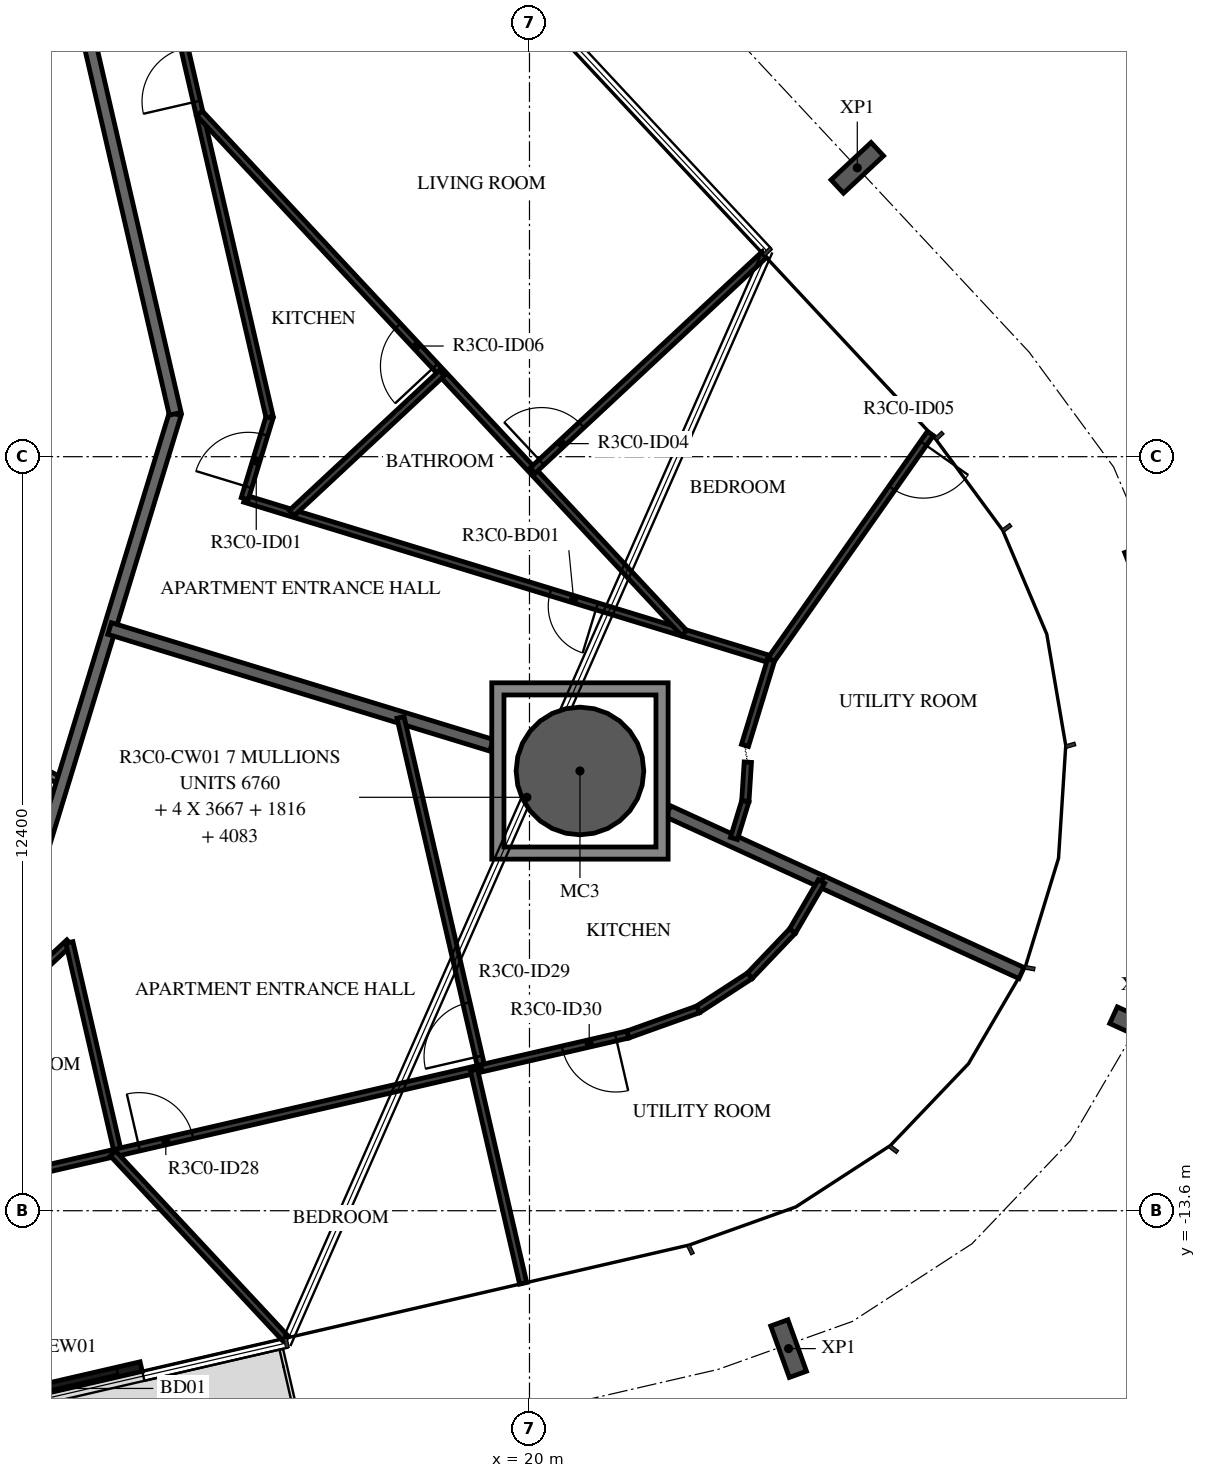
"""IFC4 building model, lengths in metres.
Left out: names, types, materials, properties, quantities, classifications, styles, units other than length and angle.
Written with IfcOpenShell. Run it as: python <this file> out.ifc"""

import sys

from ifc_helpers import new_model, si_unit, direction, frame, frame_2d, origin, origin_2d, place, context, subcontext, project, spatial, polyline, rectangle, hollow_circle, i_section, outline, extrude, element, fill, save


model = new_model("IFC4")
c1 = context("Model", 3, precision=1e-05, world=origin(), true_north=direction((0.0, 1.0)))
c2 = subcontext(c1, "Body", "Model", "MODEL_VIEW")
j1 = project(units=[si_unit("LENGTHUNIT", "METRE"), si_unit("PLANEANGLEUNIT", "RADIAN")], contexts=[c1])
p1 = place(None, origin())
s1 = spatial("IfcSite", under=j1, at=p1, CompositionType="ELEMENT")
p2 = place(p1, origin())
s2 = spatial("IfcBuilding", under=s1, at=p2, CompositionType="ELEMENT")
p3 = place(p2, frame((0.0, 0.0, 141.4)))
s3 = spatial("IfcBuildingStorey", under=s2, at=p3, CompositionType="ELEMENT", Elevation=141.4)
p4 = place(p3, frame((20.83, -6.368, -0.38), z_axis=(0.0, 0.0, 1.0), x_axis=(1.0, 0.0, 0.0)))
e1 = element("IfcColumn", 1, at=p4, inside=s3, PredefinedType="COLUMN", context=c2, shape_type="SweptSolid", body=[
    extrude(hollow_circle(Radius=1.05, WallThickness=0.05, at=origin_2d()), origin(), (0.0, 0.0, 1.0), 2.616),
])
for number, where, z_axis, x_axis in (
    (2, (24.261, -15.868, -0.38), (0.0, 0.0, 1.0), (-0.941, -0.34, 0.0)),
    (3, (30.014, -10.571, -0.38), (0.0, 0.0, 1.0), (-0.416, -0.909, 0.0)),
    (4, (30.262, -2.756, -0.38), (0.0, 0.0, 1.0), (0.358, -0.934, 0.0)),
    (5, (25.391, 3.55, -0.38), (0.0, 0.0, 1.0), (0.682, -0.731, 0.0)),
):
    element("IfcColumn", number, at=place(p3, frame(where, z_axis=z_axis, x_axis=x_axis)), inside=s3, PredefinedType="COLUMN", context=c2, shape_type="SweptSolid", body=[
        extrude(i_section(OverallWidth=0.3, OverallDepth=0.9, WebThickness=0.019, FlangeThickness=0.035, FilletRadius=0.03, at=origin_2d()), origin(), (0.0, 0.0, 1.0), 2.616),
    ])
p5 = place(p3, frame((10.496, -16.883, 0.0), z_axis=(0.0, 0.0, 1.0), x_axis=(0.974364187477, 0.224976510247, 0.0)))
e6 = element("IfcWall", 6, at=p5, inside=s3, PredefinedType="STANDARD", context=c2, shape_type="SweptSolid", body=[
    extrude(rectangle(XDim=3.2, YDim=0.16, at=frame_2d((1.6, 0.0))), origin(), (0.0, 0.0, 1.0), 3.05),
])
p6 = place(p5, frame((0.4, 0.0, 0.0)))
e7 = element("IfcOpeningElement", 7, at=p6, cuts=e6, PredefinedType="OPENING", context=c2, shape_type="SweptSolid", body=[
    extrude(rectangle(XDim=2.4, YDim=2.4, at=frame_2d((1.2, 1.2))), frame((0.0, 0.09, 0.0), z_axis=(0.0, -1.0, 0.0), x_axis=(1.0, 0.0, 0.0)), (0.0, 0.0, 1.0), 0.18),
])
p7 = place(p3, frame((10.511, -5.589, 0.0), z_axis=(0.0, 0.0, 1.0), x_axis=(0.882987820808, -0.469395897196, 0.0)))
e8 = element("IfcWall", 8, at=p7, inside=s3, PredefinedType="PARTITIONING", context=c2, shape_type="SweptSolid", body=[
    extrude(rectangle(XDim=2.052, YDim=0.12, at=frame_2d((1.026, 0.0))), origin(), (0.0, 0.0, 1.0), 3.05),
])
p8 = place(p7, frame((0.1, 0.0, 0.0)))
e9 = element("IfcOpeningElement", 9, at=p8, cuts=e8, PredefinedType="OPENING", context=c2, shape_type="SweptSolid", body=[
    extrude(rectangle(XDim=1.2, YDim=2.1, at=frame_2d((0.6, 1.05))), frame((0.0, 0.07, 0.0), z_axis=(0.0, -1.0, 0.0), x_axis=(1.0, 0.0, 0.0)), (0.0, 0.0, 1.0), 0.14),
])
p9 = place(p3, frame((12.028, -7.516, 0.0), z_axis=(0.0, 0.0, 1.0), x_axis=(0.292365533182, 0.956306642771, 0.0)))
e10 = element("IfcWall", 10, at=p9, inside=s3, PredefinedType="STANDARD", context=c2, shape_type="SweptSolid", body=[
    extrude(rectangle(XDim=7.342, YDim=0.2, at=frame_2d((3.671, 0.0))), origin(), (0.0, 0.0, 1.0), 3.05),
])
p10 = place(p3, frame((14.175, -0.495, 0.0), z_axis=(0.0, 0.0, 1.0), x_axis=(-0.224922649383, 0.974376622151, 0.0)))
e11 = element("IfcWall", 11, at=p10, inside=s3, PredefinedType="STANDARD", context=c2, shape_type="SweptSolid", body=[
    extrude(rectangle(XDim=7.342, YDim=0.2, at=frame_2d((3.671, 0.0))), origin(), (0.0, 0.0, 1.0), 3.05),
])
p11 = place(p3, frame((13.095, -4.026, 0.0), z_axis=(0.0, 0.0, 1.0), x_axis=(0.956303942966, -0.292374363904, 0.0)))
e12 = element("IfcWall", 12, at=p11, inside=s3, PredefinedType="STANDARD", context=c2, shape_type="SweptSolid", body=[
    extrude(rectangle(XDim=6.567, YDim=0.2, at=frame_2d((3.284, 0.0))), origin(), (0.0, 0.0, 1.0), 3.05),
])
p12 = place(p3, frame((22.28, -7.032, 0.0), z_axis=(0.0, 0.0, 1.0), x_axis=(0.909302252994, -0.416136291016, 0.0)))
e13 = element("IfcWall", 13, at=p12, inside=s3, PredefinedType="STANDARD", context=c2, shape_type="SweptSolid", body=[
    extrude(rectangle(XDim=2.773, YDim=0.2, at=frame_2d((1.387, 0.0))), origin(), (0.0, 0.0, 1.0), 3.05),
])
p13 = place(p3, frame((24.802, -8.186, 0.0), z_axis=(0.0, 0.0, 1.0), x_axis=(0.909307466213, -0.416124899387, 0.0)))
e14 = element("IfcWall", 14, at=p13, inside=s3, PredefinedType="STANDARD", context=c2, shape_type="SweptSolid", body=[
    extrude(rectangle(XDim=3.618, YDim=0.2, at=frame_2d((1.809, 0.0))), origin(), (0.0, 0.0, 1.0), 3.05),
])
p14 = place(p3, frame((23.975, -4.537, 0.0), z_axis=(0.0, 0.0, 1.0), x_axis=(-0.956300480156, 0.292385689892, 0.0)))
e15 = element("IfcWall", 15, at=p14, inside=s3, PredefinedType="PARTITIONING", context=c2, shape_type="SweptSolid", body=[
    extrude(rectangle(XDim=9.054, YDim=0.12, at=frame_2d((4.527, 0.0))), origin(), (0.0, 0.0, 1.0), 3.05),
])
p15 = place(p14, frame((2.998, 0.0, 0.0)))
e16 = element("IfcOpeningElement", 16, at=p15, cuts=e15, PredefinedType="OPENING", context=c2, shape_type="SweptSolid", body=[
    extrude(rectangle(XDim=0.8, YDim=2.1, at=frame_2d((0.4, 1.05))), frame((0.0, 0.07, 0.0), z_axis=(0.0, -1.0, 0.0), x_axis=(1.0, 0.0, 0.0)), (0.0, 0.0, 1.0), 0.14),
])
p16 = place(p3, frame((15.317, -1.89, 0.0), z_axis=(0.0, 0.0, 1.0), x_axis=(0.292360095486, 0.956308305186, 0.0)))
e17 = element("IfcWall", 17, at=p16, inside=s3, PredefinedType="PARTITIONING", context=c2, shape_type="SweptSolid", body=[
    extrude(rectangle(XDim=1.402, YDim=0.12, at=frame_2d((0.701, 0.0))), origin(), (0.0, 0.0, 1.0), 3.05),
])
p17 = place(p16, frame((0.2, 0.0, 0.0)))
e18 = element("IfcOpeningElement", 18, at=p17, cuts=e17, PredefinedType="OPENING", context=c2, shape_type="SweptSolid", body=[
    extrude(rectangle(XDim=0.9, YDim=2.1, at=frame_2d((0.45, 1.05))), frame((0.0, 0.07, 0.0), z_axis=(0.0, -1.0, 0.0), x_axis=(1.0, 0.0, 0.0)), (0.0, 0.0, 1.0), 0.14),
])
p18 = place(p3, frame((15.727, -0.549, 0.0), z_axis=(0.0, 0.0, 1.0), x_axis=(-0.22493611855, 0.974373512864, 0.0)))
e19 = element("IfcWall", 19, at=p18, inside=s3, PredefinedType="PARTITIONING", context=c2, shape_type="SweptSolid", body=[
    extrude(rectangle(XDim=8.146, YDim=0.12, at=frame_2d((4.073, 0.0))), origin(), (0.0, 0.0, 1.0), 3.05),
])
p19 = place(p18, frame((5.327, 0.0, 0.0)))
e20 = element("IfcOpeningElement", 20, at=p19, cuts=e19, PredefinedType="OPENING", context=c2, shape_type="SweptSolid", body=[
    extrude(rectangle(XDim=0.9, YDim=2.1, at=frame_2d((0.45, 1.05))), frame((0.0, 0.07, 0.0), z_axis=(0.0, -1.0, 0.0), x_axis=(1.0, 0.0, 0.0)), (0.0, 0.0, 1.0), 0.14),
])
for number, where, z_axis, x_axis in (
    (21, (23.362, -7.478, 0.0), (0.0, 0.0, 1.0), (0.293, 0.956, 0.0)),
    (22, (23.55, -6.864, 0.0), (0.0, 0.0, 1.0), (0.064, 0.998, 0.0)),
):
    element("IfcWall", number, at=place(p3, frame(where, z_axis=z_axis, x_axis=x_axis)), inside=s3, PredefinedType="PARTITIONING", context=c2, shape_type="SweptSolid", body=[
        extrude(rectangle(XDim=0.642, YDim=0.12, at=frame_2d((0.321, 0.0))), origin(), (0.0, 0.0, 1.0), 3.05),
    ])
p20 = place(p3, frame((23.544, -5.948, 0.0), z_axis=(0.0, 0.0, 1.0), x_axis=(0.292386782861, 0.956300145983, 0.0)))
e23 = element("IfcWall", 23, at=p20, inside=s3, PredefinedType="PARTITIONING", context=c2, shape_type="SweptSolid", body=[
    extrude(rectangle(XDim=1.475, YDim=0.12, at=frame_2d((0.737, 0.0))), origin(), (0.0, 0.0, 1.0), 3.05),
])
p21 = place(p3, frame((22.543, -4.1, 0.0), z_axis=(0.0, 0.0, 1.0), x_axis=(-0.681980976228, 0.731369911921, 0.0)))
e24 = element("IfcWall", 24, at=p21, inside=s3, PredefinedType="PARTITIONING", context=c2, shape_type="SweptSolid", body=[
    extrude(rectangle(XDim=11.686, YDim=0.12, at=frame_2d((5.843, 0.0))), origin(), (0.0, 0.0, 1.0), 3.05),
])
p22 = place(p21, frame((6.003, 0.0, 0.0)))
e25 = element("IfcOpeningElement", 25, at=p22, cuts=e24, PredefinedType="OPENING", context=c2, shape_type="SweptSolid", body=[
    extrude(rectangle(XDim=0.9, YDim=2.1, at=frame_2d((0.45, 1.05))), frame((0.0, 0.07, 0.0), z_axis=(0.0, -1.0, 0.0), x_axis=(1.0, 0.0, 0.0)), (0.0, 0.0, 1.0), 0.14),
])
p23 = place(p3, frame((16.091, -2.127, 0.0), z_axis=(0.0, 0.0, 1.0), x_axis=(0.731389706697, 0.6819597473, 0.0)))
e26 = element("IfcWall", 26, at=p23, inside=s3, PredefinedType="PARTITIONING", context=c2, shape_type="SweptSolid", body=[
    extrude(rectangle(XDim=3.374, YDim=0.12, at=frame_2d((1.687, 0.0))), origin(), (0.0, 0.0, 1.0), 3.05),
])
p24 = place(p3, frame((20.052, -1.428, 0.0), z_axis=(0.0, 0.0, 1.0), x_axis=(0.73134872518, 0.682003696601, 0.0)))
e27 = element("IfcWall", 27, at=p24, inside=s3, PredefinedType="PARTITIONING", context=c2, shape_type="SweptSolid", body=[
    extrude(rectangle(XDim=5.2, YDim=0.12, at=frame_2d((2.6, 0.0))), origin(), (0.0, 0.0, 1.0), 3.05),
])
p25 = place(p24, frame((0.2, 0.0, 0.0)))
e28 = element("IfcOpeningElement", 28, at=p25, cuts=e27, PredefinedType="OPENING", context=c2, shape_type="SweptSolid", body=[
    extrude(rectangle(XDim=0.9, YDim=2.1, at=frame_2d((0.45, 1.05))), frame((0.0, 0.07, 0.0), z_axis=(0.0, -1.0, 0.0), x_axis=(1.0, 0.0, 0.0)), (0.0, 0.0, 1.0), 0.14),
])
p26 = place(p3, frame((26.593, -0.818, 0.0), z_axis=(0.0, 0.0, 1.0), x_axis=(-0.575629018128, -0.817710971853, 0.0)))
e29 = element("IfcWall", 29, at=p26, inside=s3, PredefinedType="PARTITIONING", context=c2, shape_type="SweptSolid", body=[
    extrude(rectangle(XDim=4.548, YDim=0.12, at=frame_2d((2.274, 0.0))), origin(), (0.0, 0.0, 1.0), 3.05),
])
p27 = place(p26, frame((0.2, 0.0, 0.0)))
e30 = element("IfcOpeningElement", 30, at=p27, cuts=e29, PredefinedType="OPENING", context=c2, shape_type="SweptSolid", body=[
    extrude(rectangle(XDim=0.9, YDim=2.1, at=frame_2d((0.45, 1.05))), frame((0.0, 0.07, 0.0), z_axis=(0.0, -1.0, 0.0), x_axis=(1.0, 0.0, 0.0)), (0.0, 0.0, 1.0), 0.14),
])
p28 = place(p3, frame((7.388, -13.894, 0.0), z_axis=(0.0, 0.0, 1.0), x_axis=(0.731339966659, 0.682013088707, 0.0)))
e31 = element("IfcWall", 31, at=p28, inside=s3, PredefinedType="PARTITIONING", context=c2, shape_type="SweptSolid", body=[
    extrude(rectangle(XDim=6.899, YDim=0.12, at=frame_2d((3.45, 0.0))), origin(), (0.0, 0.0, 1.0), 3.05),
])
p29 = place(p28, frame((1.3, 0.0, 0.0)))
e32 = element("IfcOpeningElement", 32, at=p29, cuts=e31, PredefinedType="OPENING", context=c2, shape_type="SweptSolid", body=[
    extrude(rectangle(XDim=0.8, YDim=2.1, at=frame_2d((0.4, 1.05))), frame((0.0, 0.07, 0.0), z_axis=(0.0, -1.0, 0.0), x_axis=(1.0, 0.0, 0.0)), (0.0, 0.0, 1.0), 0.14),
])
p30 = place(p3, frame((12.434, -9.189, 0.0), z_axis=(0.0, 0.0, 1.0), x_axis=(0.224924972887, -0.974376085796, 0.0)))
e33 = element("IfcWall", 33, at=p30, inside=s3, PredefinedType="PARTITIONING", context=c2, shape_type="SweptSolid", body=[
    extrude(rectangle(XDim=3.541, YDim=0.12, at=frame_2d((1.771, 0.0))), origin(), (0.0, 0.0, 1.0), 3.05),
])
p31 = place(p3, frame((7.249, -14.02, 0.0), z_axis=(0.0, 0.0, 1.0), x_axis=(0.974369514697, 0.224953437023, 0.0)))
e34 = element("IfcWall", 34, at=p31, inside=s3, PredefinedType="PARTITIONING", context=c2, shape_type="SweptSolid", body=[
    extrude(rectangle(XDim=12.149, YDim=0.12, at=frame_2d((6.074, 0.0))), origin(), (0.0, 0.0, 1.0), 3.05),
])
p32 = place(p31, frame((6.498, 0.0, 0.0)))
e35 = element("IfcOpeningElement", 35, at=p32, cuts=e34, PredefinedType="OPENING", context=c2, shape_type="SweptSolid", body=[
    extrude(rectangle(XDim=0.9, YDim=2.1, at=frame_2d((0.45, 1.05))), frame((0.0, 0.07, 0.0), z_axis=(0.0, -1.0, 0.0), x_axis=(1.0, 0.0, 0.0)), (0.0, 0.0, 1.0), 0.14),
])
p33 = place(p3, frame((19.211, -11.258, 0.0), z_axis=(0.0, 0.0, 1.0), x_axis=(-0.22499500936, 0.974359915926, 0.0)))
e36 = element("IfcWall", 36, at=p33, inside=s3, PredefinedType="PARTITIONING", context=c2, shape_type="SweptSolid", body=[
    extrude(rectangle(XDim=5.921, YDim=0.12, at=frame_2d((2.961, 0.0))), origin(), (0.0, 0.0, 1.0), 3.05),
])
p34 = place(p33, frame((0.2, 0.0, 0.0)))
e37 = element("IfcOpeningElement", 37, at=p34, cuts=e36, PredefinedType="OPENING", context=c2, shape_type="SweptSolid", body=[
    extrude(rectangle(XDim=0.9, YDim=2.1, at=frame_2d((0.45, 1.05))), frame((0.0, 0.07, 0.0), z_axis=(0.0, -1.0, 0.0), x_axis=(1.0, 0.0, 0.0)), (0.0, 0.0, 1.0), 0.14),
])
p35 = place(p3, frame((15.985, -15.698, 0.0), z_axis=(0.0, 0.0, 1.0), x_axis=(-0.681979185924, 0.731371581322, 0.0)))
e38 = element("IfcWall", 38, at=p35, inside=s3, PredefinedType="PARTITIONING", context=c2, shape_type="SweptSolid", body=[
    extrude(rectangle(XDim=4.157, YDim=0.12, at=frame_2d((2.079, 0.0))), origin(), (0.0, 0.0, 1.0), 3.05),
])
p36 = place(p3, frame((19.896, -14.794, 0.0), z_axis=(0.0, 0.0, 1.0), x_axis=(-0.224958568294, 0.974368330023, 0.0)))
e39 = element("IfcWall", 39, at=p36, inside=s3, PredefinedType="PARTITIONING", context=c2, shape_type="SweptSolid", body=[
    extrude(rectangle(XDim=3.6, YDim=0.12, at=frame_2d((1.8, 0.0))), origin(), (0.0, 0.0, 1.0), 3.05),
])
p37 = place(p3, frame((24.802, -8.186, 0.0), z_axis=(0.0, 0.0, 1.0), x_axis=(-0.505043103481, -0.863094122113, 0.0)))
e40 = element("IfcWall", 40, at=p37, inside=s3, PredefinedType="PARTITIONING", context=c2, shape_type="SweptSolid", body=[
    extrude(rectangle(XDim=0.945, YDim=0.12, at=frame_2d((0.473, 0.0))), origin(), (0.0, 0.0, 1.0), 3.05),
])
for number, where, z_axis, x_axis in (
    (41, (24.324, -9.002, 0.0), (0.0, 0.0, 1.0), (-0.69, -0.723, 0.0)),
    (42, (23.623, -9.737, 0.0), (0.0, 0.0, 1.0), (-0.839, -0.545, 0.0)),
):
    element("IfcWall", number, at=place(p3, frame(where, z_axis=z_axis, x_axis=x_axis)), inside=s3, PredefinedType="PARTITIONING", context=c2, shape_type="SweptSolid", body=[
        extrude(rectangle(XDim=1.016, YDim=0.12, at=frame_2d((0.508, 0.0))), origin(), (0.0, 0.0, 1.0), 3.05),
    ])
p38 = place(p3, frame((22.771, -10.29, 0.0), z_axis=(0.0, 0.0, 1.0), x_axis=(-0.941701391526, -0.336449831623, 0.0)))
e43 = element("IfcWall", 43, at=p38, inside=s3, PredefinedType="PARTITIONING", context=c2, shape_type="SweptSolid", body=[
    extrude(rectangle(XDim=1.227, YDim=0.12, at=frame_2d((0.614, 0.0))), origin(), (0.0, 0.0, 1.0), 3.05),
])
p39 = place(p3, frame((21.615, -10.703, 0.0), z_axis=(0.0, 0.0, 1.0), x_axis=(-0.974361171506, -0.224989571893, 0.0)))
e44 = element("IfcWall", 44, at=p39, inside=s3, PredefinedType="PARTITIONING", context=c2, shape_type="SweptSolid", body=[
    extrude(rectangle(XDim=2.468, YDim=0.12, at=frame_2d((1.234, 0.0))), origin(), (0.0, 0.0, 1.0), 3.05),
])
p40 = place(p39, frame((0.2, 0.0, 0.0)))
e45 = element("IfcOpeningElement", 45, at=p40, cuts=e44, PredefinedType="OPENING", context=c2, shape_type="SweptSolid", body=[
    extrude(rectangle(XDim=0.9, YDim=2.1, at=frame_2d((0.45, 1.05))), frame((0.0, 0.07, 0.0), z_axis=(0.0, -1.0, 0.0), x_axis=(1.0, 0.0, 0.0)), (0.0, 0.0, 1.0), 0.14),
])
p41 = place(p3, origin())
e46 = element("IfcWall", 46, at=p41, inside=s3, PredefinedType="STANDARD", context=c2, shape_type="SweptSolid", body=[
    extrude(outline(polyline([(22.28, -4.918), (22.28, -7.818), (19.38, -7.818), (19.38, -4.918), (22.28, -4.918)]), holes=[polyline([(19.58, -7.618), (22.08, -7.618), (22.08, -5.118), (19.58, -5.118), (19.58, -7.618)])]), origin(), (0.0, 0.0, 1.0), 3.05),
])
p42 = place(p6, origin())
e47 = element("IfcDoor", 47, at=p42, inside=s3, OperationType="DOUBLE_DOOR_SLIDING", PredefinedType="DOOR", context=c2, shape_type="SweptSolid", body=[
    extrude(rectangle(XDim=2.4, YDim=2.4, at=frame_2d((1.2, 1.2))), frame((0.0, 0.025, 0.0), z_axis=(0.0, -1.0, 0.0), x_axis=(1.0, 0.0, 0.0)), (0.0, 0.0, 1.0), 0.05),
])
fill(e7, e47)
p43 = place(p17, origin())
e48 = element("IfcDoor", 48, at=p43, inside=s3, OperationType="SINGLE_SWING_LEFT", PredefinedType="DOOR", context=c2, shape_type="SweptSolid", body=[
    extrude(rectangle(XDim=0.9, YDim=2.1, at=frame_2d((0.45, 1.05))), frame((0.0, 0.025, 0.0), z_axis=(0.0, -1.0, 0.0), x_axis=(1.0, 0.0, 0.0)), (0.0, 0.0, 1.0), 0.05),
])
fill(e18, e48)
p44 = place(p19, origin())
e49 = element("IfcDoor", 49, at=p44, inside=s3, OperationType="SINGLE_SWING_LEFT", PredefinedType="DOOR", context=c2, shape_type="SweptSolid", body=[
    extrude(rectangle(XDim=0.9, YDim=2.1, at=frame_2d((0.45, 1.05))), frame((0.0, 0.025, 0.0), z_axis=(0.0, -1.0, 0.0), x_axis=(1.0, 0.0, 0.0)), (0.0, 0.0, 1.0), 0.05),
])
fill(e20, e49)
p45 = place(p15, origin())
e50 = element("IfcDoor", 50, at=p45, inside=s3, OperationType="SINGLE_SWING_LEFT", PredefinedType="DOOR", context=c2, shape_type="SweptSolid", body=[
    extrude(rectangle(XDim=0.8, YDim=2.1, at=frame_2d((0.4, 1.05))), frame((0.0, 0.025, 0.0), z_axis=(0.0, -1.0, 0.0), x_axis=(1.0, 0.0, 0.0)), (0.0, 0.0, 1.0), 0.05),
])
fill(e16, e50)
p46 = place(p25, origin())
e51 = element("IfcDoor", 51, at=p46, inside=s3, OperationType="SINGLE_SWING_LEFT", PredefinedType="DOOR", context=c2, shape_type="SweptSolid", body=[
    extrude(rectangle(XDim=0.9, YDim=2.1, at=frame_2d((0.45, 1.05))), frame((0.0, 0.025, 0.0), z_axis=(0.0, -1.0, 0.0), x_axis=(1.0, 0.0, 0.0)), (0.0, 0.0, 1.0), 0.05),
])
fill(e28, e51)
p47 = place(p27, origin())
e52 = element("IfcDoor", 52, at=p47, inside=s3, OperationType="SINGLE_SWING_LEFT", PredefinedType="DOOR", context=c2, shape_type="SweptSolid", body=[
    extrude(rectangle(XDim=0.9, YDim=2.1, at=frame_2d((0.45, 1.05))), frame((0.0, 0.025, 0.0), z_axis=(0.0, -1.0, 0.0), x_axis=(1.0, 0.0, 0.0)), (0.0, 0.0, 1.0), 0.05),
])
fill(e30, e52)
p48 = place(p22, origin())
e53 = element("IfcDoor", 53, at=p48, inside=s3, OperationType="SINGLE_SWING_RIGHT", PredefinedType="DOOR", context=c2, shape_type="SweptSolid", body=[
    extrude(rectangle(XDim=0.9, YDim=2.1, at=frame_2d((0.45, 1.05))), frame((0.0, 0.025, 0.0), z_axis=(0.0, -1.0, 0.0), x_axis=(1.0, 0.0, 0.0)), (0.0, 0.0, 1.0), 0.05),
])
fill(e25, e53)
p49 = place(p32, origin())
e54 = element("IfcDoor", 54, at=p49, inside=s3, OperationType="SINGLE_SWING_RIGHT", PredefinedType="DOOR", context=c2, shape_type="SweptSolid", body=[
    extrude(rectangle(XDim=0.9, YDim=2.1, at=frame_2d((0.45, 1.05))), frame((0.0, 0.025, 0.0), z_axis=(0.0, -1.0, 0.0), x_axis=(1.0, 0.0, 0.0)), (0.0, 0.0, 1.0), 0.05),
])
fill(e35, e54)
p50 = place(p34, origin())
e55 = element("IfcDoor", 55, at=p50, inside=s3, OperationType="SINGLE_SWING_RIGHT", PredefinedType="DOOR", context=c2, shape_type="SweptSolid", body=[
    extrude(rectangle(XDim=0.9, YDim=2.1, at=frame_2d((0.45, 1.05))), frame((0.0, 0.025, 0.0), z_axis=(0.0, -1.0, 0.0), x_axis=(1.0, 0.0, 0.0)), (0.0, 0.0, 1.0), 0.05),
])
fill(e37, e55)
p51 = place(p40, origin())
e56 = element("IfcDoor", 56, at=p51, inside=s3, OperationType="SINGLE_SWING_RIGHT", PredefinedType="DOOR", context=c2, shape_type="SweptSolid", body=[
    extrude(rectangle(XDim=0.9, YDim=2.1, at=frame_2d((0.45, 1.05))), frame((0.0, 0.025, 0.0), z_axis=(0.0, -1.0, 0.0), x_axis=(1.0, 0.0, 0.0)), (0.0, 0.0, 1.0), 0.05),
])
fill(e45, e56)
save(model, sys.argv[1])
